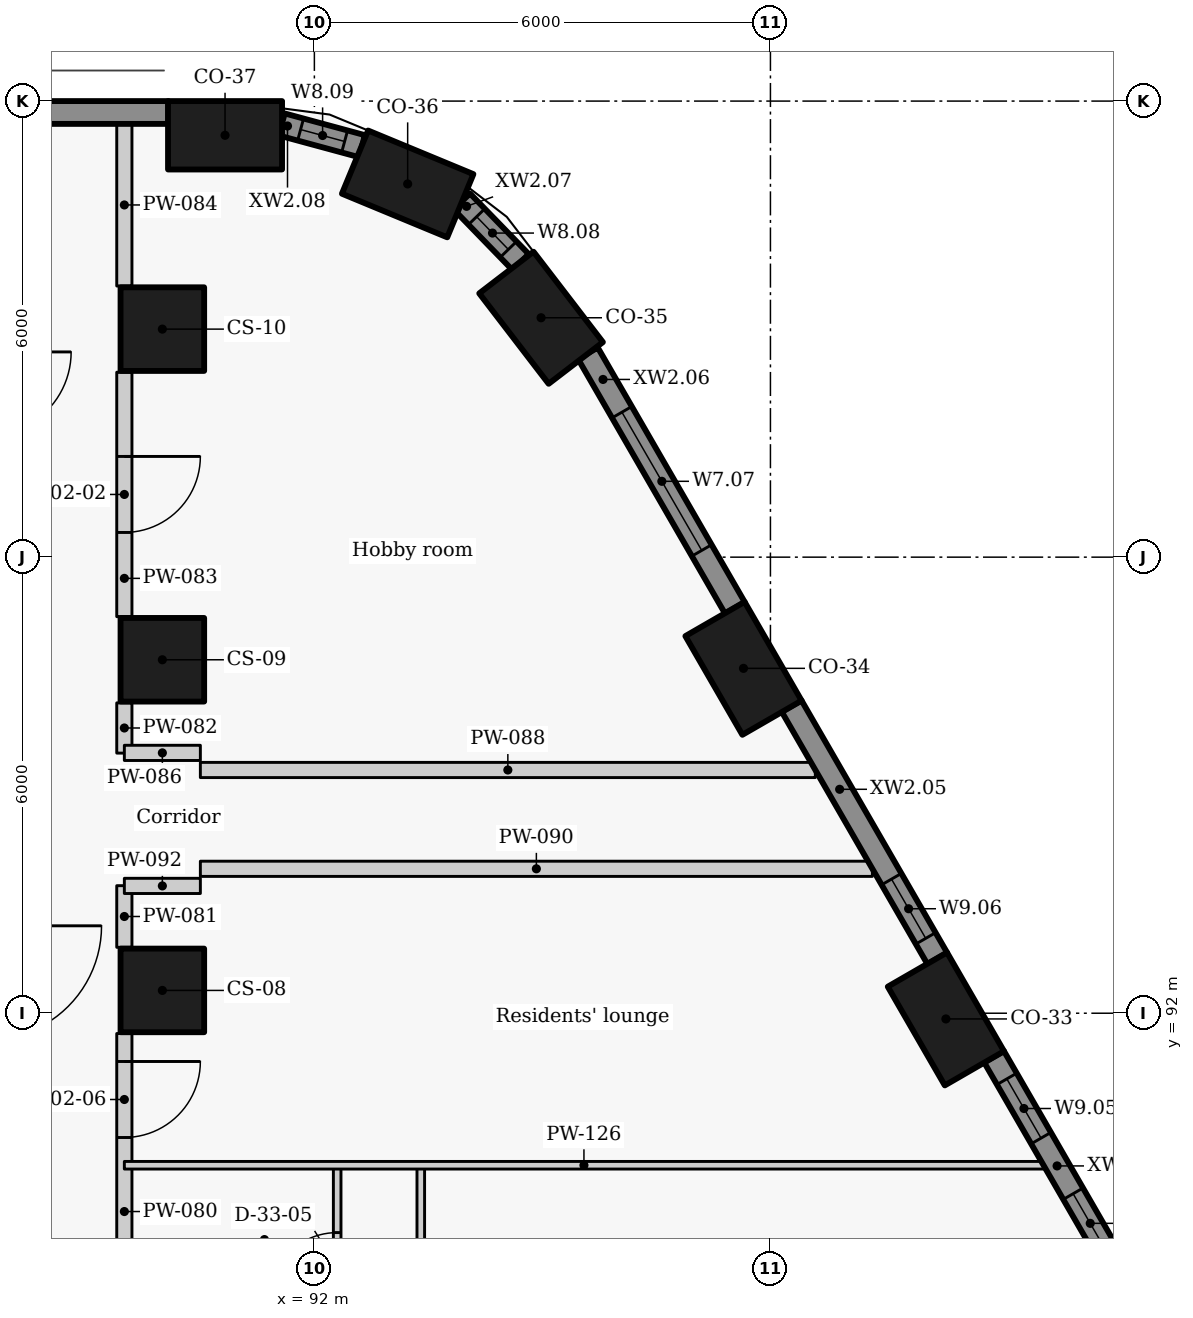
"""IFC4 building model, lengths in metres.
Left out: names, types, materials, properties, quantities, classifications, styles, units other than length and angle.
Written with IfcOpenShell. Run it as: python <this file> out.ifc"""

import sys

from ifc_helpers import new_model, si_unit, direction, frame, frame_2d, origin, origin_2d, place, context, subcontext, project, spatial, rectangle, extrude, element, fill, save


model = new_model("IFC4")
c1 = context("Model", 3, precision=1e-05, world=origin(), true_north=direction((0.0, 1.0)))
c2 = subcontext(c1, "Body", "Model", "MODEL_VIEW")
j1 = project(units=[si_unit("LENGTHUNIT", "METRE"), si_unit("PLANEANGLEUNIT", "RADIAN")], contexts=[c1])
p1 = place(None, origin())
s1 = spatial("IfcSite", under=j1, at=p1, CompositionType="ELEMENT")
p2 = place(p1, origin())
s2 = spatial("IfcBuilding", under=s1, at=p2, CompositionType="ELEMENT")
p3 = place(p2, frame((0.0, 0.0, 44.7)))
s3 = spatial("IfcBuildingStorey", under=s2, at=p3, CompositionType="ELEMENT", Elevation=44.7)
for number, where, z_axis, x_axis in (
    (1, (100.308, 91.925, 0.0), (0.0, 0.0, 1.0), (-0.5, 0.866, 0.0)),
    (2, (97.646, 96.537, 0.0), (0.0, 0.0, 1.0), (-0.5, 0.866, 0.0)),
    (3, (94.982, 101.149, 0.0), (0.0, 0.0, 1.0), (-0.609, 0.793, 0.0)),
    (4, (93.227, 102.91, 0.0), (0.0, 0.0, 1.0), (-0.924, 0.383, 0.0)),
    (5, (90.825, 103.55, 0.0), (0.0, 0.0, 1.0), (-1.0, 0.0, 0.0)),
):
    element("IfcColumn", number, at=place(p3, frame(where, z_axis=z_axis, x_axis=x_axis)), inside=s3, PredefinedType="COLUMN", context=c2, shape_type="SweptSolid", body=[
        extrude(rectangle(XDim=1.5, YDim=0.9, at=origin_2d()), origin(), (0.0, 0.0, 1.0), 3.3),
    ])
for number, where, z_axis, x_axis in (
    (6, (90.0, 92.3, 0.0), (0.0, 0.0, 1.0), (0.0, 1.0, 0.0)),
    (7, (90.0, 96.65, 0.0), (0.0, 0.0, 1.0), (0.0, 1.0, 0.0)),
    (8, (90.0, 101.0, 0.0), (0.0, 0.0, 1.0), (0.0, 1.0, 0.0)),
):
    element("IfcColumn", number, at=place(p3, frame(where, z_axis=z_axis, x_axis=x_axis)), inside=s3, PredefinedType="COLUMN", context=c2, shape_type="SweptSolid", body=[
        extrude(rectangle(XDim=1.1, YDim=1.1, at=origin_2d()), origin(), (0.0, 0.0, 1.0), 3.3),
    ])
p4 = place(p3, frame((102.71, 88.366, 0.0), z_axis=(0.0, 0.0, 1.0), x_axis=(-0.499977402622, 0.866038449993, 0.0)))
e9 = element("IfcWall", 9, at=p4, inside=s3, PredefinedType="SOLIDWALL", context=c2, shape_type="SweptSolid", body=[
    extrude(rectangle(XDim=3.537, YDim=0.3, at=frame_2d((1.769, 0.0))), origin(), (0.0, 0.0, 1.0), 2.425),
])
p5 = place(p4, frame((0.555, 0.0, 0.9)))
e10 = element("IfcOpeningElement", 10, at=p5, cuts=e9, PredefinedType="OPENING", context=c2, shape_type="SweptSolid", body=[
    extrude(rectangle(XDim=0.9, YDim=1.1, at=frame_2d((0.45, 0.55))), frame((0.0, 0.16, 0.0), z_axis=(0.0, -1.0, 0.0), x_axis=(1.0, 0.0, 0.0)), (0.0, 0.0, 1.0), 0.32),
])
p6 = place(p4, frame((2.299, 0.0, 0.9)))
e11 = element("IfcOpeningElement", 11, at=p6, cuts=e9, PredefinedType="OPENING", context=c2, shape_type="SweptSolid", body=[
    extrude(rectangle(XDim=0.9, YDim=1.1, at=frame_2d((0.45, 0.55))), frame((0.0, 0.16, 0.0), z_axis=(0.0, -1.0, 0.0), x_axis=(1.0, 0.0, 0.0)), (0.0, 0.0, 1.0), 0.32),
])
p7 = place(p3, frame((100.195, 92.721, 0.0), z_axis=(0.0, 0.0, 1.0), x_axis=(-0.500001735503, 0.866024401789, 0.0)))
e12 = element("IfcWall", 12, at=p7, inside=s3, PredefinedType="SOLIDWALL", context=c2, shape_type="SweptSolid", body=[
    extrude(rectangle(XDim=3.834, YDim=0.3, at=frame_2d((1.917, 0.0))), origin(), (0.0, 0.0, 1.0), 2.425),
])
p8 = place(p7, frame((0.305, 0.0, 0.9)))
e13 = element("IfcOpeningElement", 13, at=p8, cuts=e12, PredefinedType="OPENING", context=c2, shape_type="SweptSolid", body=[
    extrude(rectangle(XDim=0.9, YDim=1.1, at=frame_2d((0.45, 0.55))), frame((0.0, 0.16, 0.0), z_axis=(0.0, -1.0, 0.0), x_axis=(1.0, 0.0, 0.0)), (0.0, 0.0, 1.0), 0.32),
])
p9 = place(p3, frame((97.532, 97.333, 0.0), z_axis=(0.0, 0.0, 1.0), x_axis=(-0.499948341072, 0.866055227026, 0.0)))
e14 = element("IfcWall", 14, at=p9, inside=s3, PredefinedType="SOLIDWALL", context=c2, shape_type="SweptSolid", body=[
    extrude(rectangle(XDim=3.867, YDim=0.3, at=frame_2d((1.934, 0.0))), origin(), (0.0, 0.0, 1.0), 2.425),
])
p10 = place(p9, frame((0.872, 0.0, 0.9)))
e15 = element("IfcOpeningElement", 15, at=p10, cuts=e14, PredefinedType="OPENING", context=c2, shape_type="SweptSolid", body=[
    extrude(rectangle(XDim=2.1, YDim=1.1, at=frame_2d((1.05, 0.55))), frame((0.0, 0.16, 0.0), z_axis=(0.0, -1.0, 0.0), x_axis=(1.0, 0.0, 0.0)), (0.0, 0.0, 1.0), 0.32),
])
p11 = place(p3, frame((94.713, 101.883, 0.0), z_axis=(0.0, 0.0, 1.0), x_axis=(-0.696138968055, 0.717907053285, 0.0)))
e16 = element("IfcWall", 16, at=p11, inside=s3, PredefinedType="SOLIDWALL", context=c2, shape_type="SweptSolid", body=[
    extrude(rectangle(XDim=1.11, YDim=0.3, at=frame_2d((0.555, 0.0))), origin(), (0.0, 0.0, 1.0), 2.425),
])
p12 = place(p11, frame((0.231, 0.0, 0.9)))
e17 = element("IfcOpeningElement", 17, at=p12, cuts=e16, PredefinedType="OPENING", context=c2, shape_type="SweptSolid", body=[
    extrude(rectangle(XDim=0.6, YDim=1.1, at=frame_2d((0.3, 0.55))), frame((0.0, 0.16, 0.0), z_axis=(0.0, -1.0, 0.0), x_axis=(1.0, 0.0, 0.0)), (0.0, 0.0, 1.0), 0.32),
])
p13 = place(p3, frame((92.625, 103.407, 0.0), z_axis=(0.0, 0.0, 1.0), x_axis=(-0.96522637192, 0.261415475728, 0.0)))
e18 = element("IfcWall", 18, at=p13, inside=s3, PredefinedType="SOLIDWALL", context=c2, shape_type="SweptSolid", body=[
    extrude(rectangle(XDim=1.093, YDim=0.3, at=frame_2d((0.546, 0.0))), origin(), (0.0, 0.0, 1.0), 2.425),
])
p14 = place(p13, frame((0.236, 0.0, 0.9)))
e19 = element("IfcOpeningElement", 19, at=p14, cuts=e18, PredefinedType="OPENING", context=c2, shape_type="SweptSolid", body=[
    extrude(rectangle(XDim=0.6, YDim=1.1, at=frame_2d((0.3, 0.55))), frame((0.0, 0.16, 0.0), z_axis=(0.0, -1.0, 0.0), x_axis=(1.0, 0.0, 0.0)), (0.0, 0.0, 1.0), 0.32),
])
p15 = place(p3, frame((90.079, 103.85, 0.0), z_axis=(0.0, 0.0, 1.0), x_axis=(-1.0, 0.0, 0.0)))
e20 = element("IfcWall", 20, at=p15, inside=s3, PredefinedType="SOLIDWALL", context=c2, shape_type="SweptSolid", body=[
    extrude(rectangle(XDim=20.19, YDim=0.3, at=frame_2d((10.095, 0.0))), origin(), (0.0, 0.0, 1.0), 2.425),
])
p16 = place(p3, frame((89.5, 91.733, 0.0), z_axis=(0.0, 0.0, 1.0), x_axis=(0.0, -1.0, 0.0)))
e21 = element("IfcWall", 21, at=p16, inside=s3, PredefinedType="PARTITIONING", context=c2, shape_type="SweptSolid", body=[
    extrude(rectangle(XDim=3.216, YDim=0.2, at=frame_2d((1.608, 0.0))), origin(), (0.0, 0.0, 1.0), 3.025),
])
p17 = place(p16, frame((0.368, 0.0, 0.0)))
e22 = element("IfcOpeningElement", 22, at=p17, cuts=e21, PredefinedType="OPENING", context=c2, shape_type="SweptSolid", body=[
    extrude(rectangle(XDim=1.0, YDim=2.1, at=frame_2d((0.5, 1.05))), frame((0.0, 0.11, 0.0), z_axis=(0.0, -1.0, 0.0), x_axis=(1.0, 0.0, 0.0)), (0.0, 0.0, 1.0), 0.22),
])
p18 = place(p3, frame((89.5, 92.867, 0.0), z_axis=(0.0, 0.0, 1.0), x_axis=(0.0, 1.0, 0.0)))
e23 = element("IfcWall", 23, at=p18, inside=s3, PredefinedType="PARTITIONING", context=c2, shape_type="SweptSolid", body=[
    extrude(rectangle(XDim=0.811, YDim=0.2, at=frame_2d((0.406, 0.0))), origin(), (0.0, 0.0, 1.0), 3.025),
])
p19 = place(p3, frame((89.5, 95.422, 0.0), z_axis=(0.0, 0.0, 1.0), x_axis=(0.0, 1.0, 0.0)))
e24 = element("IfcWall", 24, at=p19, inside=s3, PredefinedType="PARTITIONING", context=c2, shape_type="SweptSolid", body=[
    extrude(rectangle(XDim=0.661, YDim=0.2, at=frame_2d((0.331, 0.0))), origin(), (0.0, 0.0, 1.0), 3.025),
])
p20 = place(p3, frame((89.5, 100.433, 0.0), z_axis=(0.0, 0.0, 1.0), x_axis=(0.0, -1.0, 0.0)))
e25 = element("IfcWall", 25, at=p20, inside=s3, PredefinedType="PARTITIONING", context=c2, shape_type="SweptSolid", body=[
    extrude(rectangle(XDim=3.216, YDim=0.2, at=frame_2d((1.608, 0.0))), origin(), (0.0, 0.0, 1.0), 3.025),
])
p21 = place(p20, frame((1.108, 0.0, 0.0)))
e26 = element("IfcOpeningElement", 26, at=p21, cuts=e25, PredefinedType="OPENING", context=c2, shape_type="SweptSolid", body=[
    extrude(rectangle(XDim=1.0, YDim=2.1, at=frame_2d((0.5, 1.05))), frame((0.0, 0.11, 0.0), z_axis=(0.0, -1.0, 0.0), x_axis=(1.0, 0.0, 0.0)), (0.0, 0.0, 1.0), 0.22),
])
p22 = place(p3, frame((89.5, 101.567, 0.0), z_axis=(0.0, 0.0, 1.0), x_axis=(0.0, 1.0, 0.0)))
e27 = element("IfcWall", 27, at=p22, inside=s3, PredefinedType="PARTITIONING", context=c2, shape_type="SweptSolid", body=[
    extrude(rectangle(XDim=2.133, YDim=0.2, at=frame_2d((1.066, 0.0))), origin(), (0.0, 0.0, 1.0), 3.025),
])
p23 = place(p3, frame((89.5, 95.425, 0.0), z_axis=(0.0, 0.0, 1.0), x_axis=(1.0, 0.0, 0.0)))
e28 = element("IfcWall", 28, at=p23, inside=s3, PredefinedType="PARTITIONING", context=c2, shape_type="SweptSolid", body=[
    extrude(rectangle(XDim=1.0, YDim=0.2, at=frame_2d((0.5, 0.0))), origin(), (0.0, 0.0, 1.0), 2.505),
])
p24 = place(p3, frame((90.5, 95.2, 0.0), z_axis=(0.0, 0.0, 1.0), x_axis=(1.0, 0.0, 0.0)))
e29 = element("IfcWall", 29, at=p24, inside=s3, PredefinedType="PARTITIONING", context=c2, shape_type="SweptSolid", body=[
    extrude(rectangle(XDim=8.091, YDim=0.2, at=frame_2d((4.045, 0.0))), origin(), (0.0, 0.0, 1.0), 2.405),
])
p25 = place(p3, frame((90.5, 93.9, 0.0), z_axis=(0.0, 0.0, 1.0), x_axis=(1.0, 0.0, 0.0)))
e30 = element("IfcWall", 30, at=p25, inside=s3, PredefinedType="PARTITIONING", context=c2, shape_type="SweptSolid", body=[
    extrude(rectangle(XDim=8.841, YDim=0.2, at=frame_2d((4.421, 0.0))), origin(), (0.0, 0.0, 1.0), 2.405),
])
p26 = place(p3, frame((89.5, 93.675, 0.0), z_axis=(0.0, 0.0, 1.0), x_axis=(1.0, 0.0, 0.0)))
e31 = element("IfcWall", 31, at=p26, inside=s3, PredefinedType="PARTITIONING", context=c2, shape_type="SweptSolid", body=[
    extrude(rectangle(XDim=1.0, YDim=0.2, at=frame_2d((0.5, 0.0))), origin(), (0.0, 0.0, 1.0), 2.505),
])
p27 = place(p3, frame((92.3, 85.1, 0.0), z_axis=(0.0, 0.0, 1.0), x_axis=(0.0, 1.0, 0.0)))
e32 = element("IfcWall", 32, at=p27, inside=s3, PredefinedType="PARTITIONING", context=c2, shape_type="SweptSolid", body=[
    extrude(rectangle(XDim=4.9, YDim=0.1, at=frame_2d((2.45, 0.0))), origin(), (0.0, 0.0, 1.0), 3.025),
])
p28 = place(p27, frame((3.114, 0.0, 0.0)))
e33 = element("IfcOpeningElement", 33, at=p28, cuts=e32, PredefinedType="OPENING", context=c2, shape_type="SweptSolid", body=[
    extrude(rectangle(XDim=0.9, YDim=2.1, at=frame_2d((0.45, 1.05))), frame((0.0, 0.06, 0.0), z_axis=(0.0, -1.0, 0.0), x_axis=(1.0, 0.0, 0.0)), (0.0, 0.0, 1.0), 0.12),
])
p29 = place(p3, frame((93.4, 90.0, 0.0), z_axis=(0.0, 0.0, 1.0), x_axis=(0.0, -1.0, 0.0)))
e34 = element("IfcWall", 34, at=p29, inside=s3, PredefinedType="PARTITIONING", context=c2, shape_type="SweptSolid", body=[
    extrude(rectangle(XDim=18.0, YDim=0.1, at=frame_2d((9.0, 0.0))), origin(), (0.0, 0.0, 1.0), 3.025),
])
p30 = place(p29, frame((16.098, 0.0, 0.0)))
e35 = element("IfcOpeningElement", 35, at=p30, cuts=e34, PredefinedType="OPENING", context=c2, shape_type="SweptSolid", body=[
    extrude(rectangle(XDim=0.9, YDim=2.1, at=frame_2d((0.45, 1.05))), frame((0.0, 0.06, 0.0), z_axis=(0.0, -1.0, 0.0), x_axis=(1.0, 0.0, 0.0)), (0.0, 0.0, 1.0), 0.12),
])
p31 = place(p29, frame((12.55, 0.0, 0.0)))
e36 = element("IfcOpeningElement", 36, at=p31, cuts=e34, PredefinedType="OPENING", context=c2, shape_type="SweptSolid", body=[
    extrude(rectangle(XDim=0.9, YDim=2.1, at=frame_2d((0.45, 1.05))), frame((0.0, 0.06, 0.0), z_axis=(0.0, -1.0, 0.0), x_axis=(1.0, 0.0, 0.0)), (0.0, 0.0, 1.0), 0.12),
])
p32 = place(p29, frame((9.002, 0.0, 0.0)))
e37 = element("IfcOpeningElement", 37, at=p32, cuts=e34, PredefinedType="OPENING", context=c2, shape_type="SweptSolid", body=[
    extrude(rectangle(XDim=0.9, YDim=2.1, at=frame_2d((0.45, 1.05))), frame((0.0, 0.06, 0.0), z_axis=(0.0, -1.0, 0.0), x_axis=(1.0, 0.0, 0.0)), (0.0, 0.0, 1.0), 0.12),
])
p33 = place(p29, frame((3.55, 0.0, 0.0)))
e38 = element("IfcOpeningElement", 38, at=p33, cuts=e34, PredefinedType="OPENING", context=c2, shape_type="SweptSolid", body=[
    extrude(rectangle(XDim=0.9, YDim=2.1, at=frame_2d((0.45, 1.05))), frame((0.0, 0.06, 0.0), z_axis=(0.0, -1.0, 0.0), x_axis=(1.0, 0.0, 0.0)), (0.0, 0.0, 1.0), 0.12),
])
p34 = place(p3, frame((89.5, 90.0, 0.0), z_axis=(0.0, 0.0, 1.0), x_axis=(1.0, 0.0, 0.0)))
e39 = element("IfcWall", 39, at=p34, inside=s3, PredefinedType="PARTITIONING", context=c2, shape_type="SweptSolid", body=[
    extrude(rectangle(XDim=12.093, YDim=0.1, at=frame_2d((6.046, 0.0))), origin(), (0.0, 0.0, 1.0), 2.405),
])
p35 = place(p5, origin())
e40 = element("IfcWindow", 40, at=p35, inside=s3, PartitioningType="SINGLE_PANEL", PredefinedType="WINDOW", context=c2, shape_type="SweptSolid", body=[
    extrude(rectangle(XDim=0.9, YDim=1.1, at=frame_2d((0.45, 0.55))), frame((0.0, 0.03, 0.0), z_axis=(0.0, -1.0, 0.0), x_axis=(1.0, 0.0, 0.0)), (0.0, 0.0, 1.0), 0.06),
])
fill(e10, e40)
p36 = place(p6, origin())
e41 = element("IfcWindow", 41, at=p36, inside=s3, PartitioningType="SINGLE_PANEL", PredefinedType="WINDOW", context=c2, shape_type="SweptSolid", body=[
    extrude(rectangle(XDim=0.9, YDim=1.1, at=frame_2d((0.45, 0.55))), frame((0.0, 0.03, 0.0), z_axis=(0.0, -1.0, 0.0), x_axis=(1.0, 0.0, 0.0)), (0.0, 0.0, 1.0), 0.06),
])
fill(e11, e41)
p37 = place(p8, origin())
e42 = element("IfcWindow", 42, at=p37, inside=s3, PartitioningType="SINGLE_PANEL", PredefinedType="WINDOW", context=c2, shape_type="SweptSolid", body=[
    extrude(rectangle(XDim=0.9, YDim=1.1, at=frame_2d((0.45, 0.55))), frame((0.0, 0.03, 0.0), z_axis=(0.0, -1.0, 0.0), x_axis=(1.0, 0.0, 0.0)), (0.0, 0.0, 1.0), 0.06),
])
fill(e13, e42)
p38 = place(p10, origin())
e43 = element("IfcWindow", 43, at=p38, inside=s3, PartitioningType="SINGLE_PANEL", PredefinedType="WINDOW", context=c2, shape_type="SweptSolid", body=[
    extrude(rectangle(XDim=2.1, YDim=1.1, at=frame_2d((1.05, 0.55))), frame((0.0, 0.03, 0.0), z_axis=(0.0, -1.0, 0.0), x_axis=(1.0, 0.0, 0.0)), (0.0, 0.0, 1.0), 0.06),
])
fill(e15, e43)
p39 = place(p12, origin())
e44 = element("IfcWindow", 44, at=p39, inside=s3, PartitioningType="SINGLE_PANEL", PredefinedType="WINDOW", context=c2, shape_type="SweptSolid", body=[
    extrude(rectangle(XDim=0.6, YDim=1.1, at=frame_2d((0.3, 0.55))), frame((0.0, 0.03, 0.0), z_axis=(0.0, -1.0, 0.0), x_axis=(1.0, 0.0, 0.0)), (0.0, 0.0, 1.0), 0.06),
])
fill(e17, e44)
p40 = place(p14, origin())
e45 = element("IfcWindow", 45, at=p40, inside=s3, PartitioningType="SINGLE_PANEL", PredefinedType="WINDOW", context=c2, shape_type="SweptSolid", body=[
    extrude(rectangle(XDim=0.6, YDim=1.1, at=frame_2d((0.3, 0.55))), frame((0.0, 0.03, 0.0), z_axis=(0.0, -1.0, 0.0), x_axis=(1.0, 0.0, 0.0)), (0.0, 0.0, 1.0), 0.06),
])
fill(e19, e45)
p41 = place(p28, origin())
e46 = element("IfcDoor", 46, at=p41, inside=s3, OperationType="SINGLE_SWING_LEFT", PredefinedType="DOOR", context=c2, shape_type="SweptSolid", body=[
    extrude(rectangle(XDim=0.9, YDim=2.1, at=frame_2d((0.45, 1.05))), frame((0.0, 0.025, 0.0), z_axis=(0.0, -1.0, 0.0), x_axis=(1.0, 0.0, 0.0)), (0.0, 0.0, 1.0), 0.05),
])
fill(e33, e46)
p42 = place(p21, origin())
e47 = element("IfcDoor", 47, at=p42, inside=s3, OperationType="SINGLE_SWING_LEFT", PredefinedType="DOOR", context=c2, shape_type="SweptSolid", body=[
    extrude(rectangle(XDim=1.0, YDim=2.1, at=frame_2d((0.5, 1.05))), frame((0.0, 0.025, 0.0), z_axis=(0.0, -1.0, 0.0), x_axis=(1.0, 0.0, 0.0)), (0.0, 0.0, 1.0), 0.05),
])
fill(e26, e47)
p43 = place(p17, origin())
e48 = element("IfcDoor", 48, at=p43, inside=s3, OperationType="SINGLE_SWING_LEFT", PredefinedType="DOOR", context=c2, shape_type="SweptSolid", body=[
    extrude(rectangle(XDim=1.0, YDim=2.1, at=frame_2d((0.5, 1.05))), frame((0.0, 0.025, 0.0), z_axis=(0.0, -1.0, 0.0), x_axis=(1.0, 0.0, 0.0)), (0.0, 0.0, 1.0), 0.05),
])
fill(e22, e48)
save(model, sys.argv[1])
